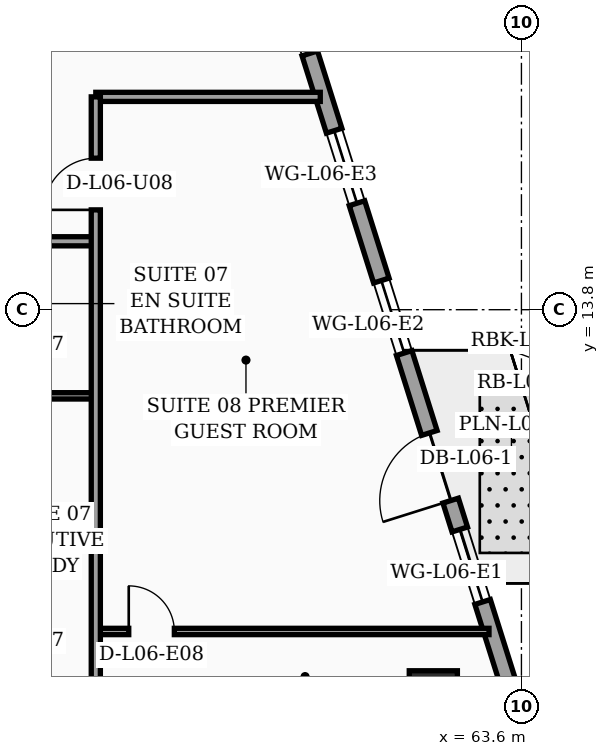
"""IFC4 building model, lengths in metres.
Left out: names, types, materials, properties, quantities, classifications, styles, units other than length and angle.
Written with IfcOpenShell. Run it as: python <this file> out.ifc"""

import sys

from ifc_helpers import new_model, si_unit, direction, frame, frame_2d, origin, origin_2d, place, context, subcontext, project, spatial, rectangle, hollow_rectangle, extrude, element, fill, save


model = new_model("IFC4")
c1 = context("Model", 3, precision=1e-05, world=origin(), true_north=direction((0.0, 1.0)))
c2 = subcontext(c1, "Body", "Model", "MODEL_VIEW")
j1 = project(units=[si_unit("LENGTHUNIT", "METRE"), si_unit("PLANEANGLEUNIT", "RADIAN")], contexts=[c1])
p1 = place(None, origin())
s1 = spatial("IfcSite", under=j1, at=p1, CompositionType="ELEMENT")
p2 = place(p1, origin())
s2 = spatial("IfcBuilding", under=s1, at=p2, CompositionType="ELEMENT")
p3 = place(p2, frame((0.0, 0.0, 30.8)))
s3 = spatial("IfcBuildingStorey", under=s2, at=p3, CompositionType="ELEMENT", Elevation=30.8)
p4 = place(p3, frame((61.861, 6.2, 0.0), z_axis=(0.0, 0.0, 1.0), x_axis=(1.0, 0.0, 0.0)))
e1 = element("IfcColumn", 1, at=p4, inside=s3, PredefinedType="COLUMN", context=c2, shape_type="SweptSolid", body=[
    extrude(hollow_rectangle(XDim=0.95, YDim=0.95, WallThickness=0.04, at=origin_2d()), origin(), (0.0, 0.0, 1.0), 3.56),
])
p5 = place(p3, frame((63.63, 5.505, 0.0), z_axis=(0.0, 0.0, 1.0), x_axis=(-0.300501856448, 0.953781229775, 0.0)))
e2 = element("IfcWall", 2, at=p5, inside=s3, PredefinedType="SOLIDWALL", context=c2, shape_type="SweptSolid", body=[
    extrude(rectangle(XDim=30.814, YDim=0.32, at=frame_2d((15.407, 0.0))), origin(), (0.0, 0.0, 1.0), 3.56),
])
p6 = place(p5, frame((4.747, 0.0, 0.0)))
e3 = element("IfcOpeningElement", 3, at=p6, cuts=e2, PredefinedType="OPENING", context=c2, shape_type="SweptSolid", body=[
    extrude(rectangle(XDim=1.4, YDim=2.25, at=frame_2d((0.7, 1.125))), frame((0.0, 0.17, 0.0), z_axis=(0.0, -1.0, 0.0), x_axis=(1.0, 0.0, 0.0)), (0.0, 0.0, 1.0), 0.34),
])
p7 = place(p5, frame((2.65, 0.0, 0.75)))
e4 = element("IfcOpeningElement", 4, at=p7, cuts=e2, PredefinedType="OPENING", context=c2, shape_type="SweptSolid", body=[
    extrude(rectangle(XDim=1.5, YDim=1.6, at=frame_2d((0.75, 0.8))), frame((0.0, 0.17, 0.0), z_axis=(0.0, -1.0, 0.0), x_axis=(1.0, 0.0, 0.0)), (0.0, 0.0, 1.0), 0.34),
])
p8 = place(p5, frame((7.8, 0.0, 0.75)))
e5 = element("IfcOpeningElement", 5, at=p8, cuts=e2, PredefinedType="OPENING", context=c2, shape_type="SweptSolid", body=[
    extrude(rectangle(XDim=1.5, YDim=1.6, at=frame_2d((0.75, 0.8))), frame((0.0, 0.17, 0.0), z_axis=(0.0, -1.0, 0.0), x_axis=(1.0, 0.0, 0.0)), (0.0, 0.0, 1.0), 0.34),
])
p9 = place(p5, frame((10.9, 0.0, 0.75)))
e6 = element("IfcOpeningElement", 6, at=p9, cuts=e2, PredefinedType="OPENING", context=c2, shape_type="SweptSolid", body=[
    extrude(rectangle(XDim=1.5, YDim=1.6, at=frame_2d((0.75, 0.8))), frame((0.0, 0.17, 0.0), z_axis=(0.0, -1.0, 0.0), x_axis=(1.0, 0.0, 0.0)), (0.0, 0.0, 1.0), 0.34),
])
p10 = place(p5, frame((14.0, 0.0, 0.75)))
e7 = element("IfcOpeningElement", 7, at=p10, cuts=e2, PredefinedType="OPENING", context=c2, shape_type="SweptSolid", body=[
    extrude(rectangle(XDim=1.5, YDim=1.6, at=frame_2d((0.75, 0.8))), frame((0.0, 0.17, 0.0), z_axis=(0.0, -1.0, 0.0), x_axis=(1.0, 0.0, 0.0)), (0.0, 0.0, 1.0), 0.34),
])
p11 = place(p5, frame((17.1, 0.0, 0.75)))
e8 = element("IfcOpeningElement", 8, at=p11, cuts=e2, PredefinedType="OPENING", context=c2, shape_type="SweptSolid", body=[
    extrude(rectangle(XDim=1.5, YDim=1.6, at=frame_2d((0.75, 0.8))), frame((0.0, 0.17, 0.0), z_axis=(0.0, -1.0, 0.0), x_axis=(1.0, 0.0, 0.0)), (0.0, 0.0, 1.0), 0.34),
])
p12 = place(p5, frame((20.2, 0.0, 0.75)))
e9 = element("IfcOpeningElement", 9, at=p12, cuts=e2, PredefinedType="OPENING", context=c2, shape_type="SweptSolid", body=[
    extrude(rectangle(XDim=1.5, YDim=1.6, at=frame_2d((0.75, 0.8))), frame((0.0, 0.17, 0.0), z_axis=(0.0, -1.0, 0.0), x_axis=(1.0, 0.0, 0.0)), (0.0, 0.0, 1.0), 0.34),
])
p13 = place(p5, frame((23.3, 0.0, 0.75)))
e10 = element("IfcOpeningElement", 10, at=p13, cuts=e2, PredefinedType="OPENING", context=c2, shape_type="SweptSolid", body=[
    extrude(rectangle(XDim=1.5, YDim=1.6, at=frame_2d((0.75, 0.8))), frame((0.0, 0.17, 0.0), z_axis=(0.0, -1.0, 0.0), x_axis=(1.0, 0.0, 0.0)), (0.0, 0.0, 1.0), 0.34),
])
p14 = place(p5, frame((26.4, 0.0, 0.75)))
e11 = element("IfcOpeningElement", 11, at=p14, cuts=e2, PredefinedType="OPENING", context=c2, shape_type="SweptSolid", body=[
    extrude(rectangle(XDim=1.5, YDim=1.6, at=frame_2d((0.75, 0.8))), frame((0.0, 0.17, 0.0), z_axis=(0.0, -1.0, 0.0), x_axis=(1.0, 0.0, 0.0)), (0.0, 0.0, 1.0), 0.34),
])
p15 = place(p3, frame((53.07, 12.1, 0.0), z_axis=(0.0, 0.0, 1.0), x_axis=(1.0, 0.0, 0.0)))
e12 = element("IfcWall", 12, at=p15, inside=s3, PredefinedType="PARTITIONING", context=c2, shape_type="SweptSolid", body=[
    extrude(rectangle(XDim=2.13, YDim=0.125, at=frame_2d((1.065, 0.0))), origin(), (0.0, 0.0, 1.0), 3.56),
])
p16 = place(p3, frame((32.4, 15.15, 0.0), z_axis=(0.0, 0.0, 1.0), x_axis=(1.0, 0.0, 0.0)))
e13 = element("IfcWall", 13, at=p16, inside=s3, PredefinedType="PARTITIONING", context=c2, shape_type="SweptSolid", body=[
    extrude(rectangle(XDim=22.8, YDim=0.18, at=frame_2d((11.4, 0.0))), origin(), (0.0, 0.0, 1.0), 2.84),
])
p17 = place(p16, frame((2.07, 0.0, 0.0)))
e14 = element("IfcOpeningElement", 14, at=p17, cuts=e13, PredefinedType="OPENING", context=c2, shape_type="SweptSolid", body=[
    extrude(rectangle(XDim=1.02, YDim=2.2, at=frame_2d((0.51, 1.1))), frame((0.0, 0.1, 0.0), z_axis=(0.0, -1.0, 0.0), x_axis=(1.0, 0.0, 0.0)), (0.0, 0.0, 1.0), 0.2),
])
p18 = place(p16, frame((9.5, 0.0, 0.0)))
e15 = element("IfcOpeningElement", 15, at=p18, cuts=e13, PredefinedType="OPENING", context=c2, shape_type="SweptSolid", body=[
    extrude(rectangle(XDim=1.02, YDim=2.2, at=frame_2d((0.51, 1.1))), frame((0.0, 0.1, 0.0), z_axis=(0.0, -1.0, 0.0), x_axis=(1.0, 0.0, 0.0)), (0.0, 0.0, 1.0), 0.2),
])
p19 = place(p16, frame((17.46, 0.0, 0.0)))
e16 = element("IfcOpeningElement", 16, at=p19, cuts=e13, PredefinedType="OPENING", context=c2, shape_type="SweptSolid", body=[
    extrude(rectangle(XDim=1.02, YDim=2.2, at=frame_2d((0.51, 1.1))), frame((0.0, 0.1, 0.0), z_axis=(0.0, -1.0, 0.0), x_axis=(1.0, 0.0, 0.0)), (0.0, 0.0, 1.0), 0.2),
])
p20 = place(p3, frame((55.2, 7.45, 0.0), z_axis=(0.0, 0.0, 1.0), x_axis=(1.0, 0.0, 0.0)))
e17 = element("IfcWall", 17, at=p20, inside=s3, PredefinedType="PARTITIONING", context=c2, shape_type="SweptSolid", body=[
    extrude(rectangle(XDim=7.76, YDim=0.125, at=frame_2d((3.88, 0.0))), origin(), (0.0, 0.0, 1.0), 3.04),
])
p21 = place(p20, frame((0.65, 0.0, 0.0)))
e18 = element("IfcOpeningElement", 18, at=p21, cuts=e17, PredefinedType="OPENING", context=c2, shape_type="SweptSolid", body=[
    extrude(rectangle(XDim=0.9, YDim=2.15, at=frame_2d((0.45, 1.075))), frame((0.0, 0.073, 0.0), z_axis=(0.0, -1.0, 0.0), x_axis=(1.0, 0.0, 0.0)), (0.0, 0.0, 1.0), 0.145),
])
p22 = place(p3, frame((55.2, 18.0, 0.0), z_axis=(0.0, 0.0, 1.0), x_axis=(1.0, 0.0, 0.0)))
e19 = element("IfcWall", 19, at=p22, inside=s3, PredefinedType="PARTITIONING", context=c2, shape_type="SweptSolid", body=[
    extrude(rectangle(XDim=4.43, YDim=0.18, at=frame_2d((2.215, 0.0))), origin(), (0.0, 0.0, 1.0), 3.04),
])
p23 = place(p3, frame((55.2, 2.44, 0.0), z_axis=(0.0, 0.0, 1.0), x_axis=(0.0, 1.0, 0.0)))
e20 = element("IfcWall", 20, at=p23, inside=s3, PredefinedType="PARTITIONING", context=c2, shape_type="SweptSolid", body=[
    extrude(rectangle(XDim=15.56, YDim=0.18, at=frame_2d((7.78, 0.0))), origin(), (0.0, 0.0, 1.0), 3.04),
])
p24 = place(p23, frame((13.33, 0.0, 0.0)))
e21 = element("IfcOpeningElement", 21, at=p24, cuts=e20, PredefinedType="OPENING", context=c2, shape_type="SweptSolid", body=[
    extrude(rectangle(XDim=1.02, YDim=2.2, at=frame_2d((0.51, 1.1))), frame((0.0, 0.1, 0.0), z_axis=(0.0, -1.0, 0.0), x_axis=(1.0, 0.0, 0.0)), (0.0, 0.0, 1.0), 0.2),
])
p25 = place(p6, origin())
e22 = element("IfcDoor", 22, at=p25, inside=s3, OperationType="SINGLE_SWING_LEFT", PredefinedType="DOOR", context=c2, shape_type="SweptSolid", body=[
    extrude(rectangle(XDim=1.4, YDim=2.25, at=frame_2d((0.7, 1.125))), frame((0.0, 0.025, 0.0), z_axis=(0.0, -1.0, 0.0), x_axis=(1.0, 0.0, 0.0)), (0.0, 0.0, 1.0), 0.05),
])
fill(e3, e22)
p26 = place(p7, origin())
e23 = element("IfcWindow", 23, at=p26, inside=s3, PartitioningType="SINGLE_PANEL", PredefinedType="WINDOW", context=c2, shape_type="SweptSolid", body=[
    extrude(rectangle(XDim=1.5, YDim=1.6, at=frame_2d((0.75, 0.8))), frame((0.0, 0.03, 0.0), z_axis=(0.0, -1.0, 0.0), x_axis=(1.0, 0.0, 0.0)), (0.0, 0.0, 1.0), 0.06),
])
fill(e4, e23)
p27 = place(p8, origin())
e24 = element("IfcWindow", 24, at=p27, inside=s3, PartitioningType="SINGLE_PANEL", PredefinedType="WINDOW", context=c2, shape_type="SweptSolid", body=[
    extrude(rectangle(XDim=1.5, YDim=1.6, at=frame_2d((0.75, 0.8))), frame((0.0, 0.03, 0.0), z_axis=(0.0, -1.0, 0.0), x_axis=(1.0, 0.0, 0.0)), (0.0, 0.0, 1.0), 0.06),
])
fill(e5, e24)
p28 = place(p9, origin())
e25 = element("IfcWindow", 25, at=p28, inside=s3, PartitioningType="SINGLE_PANEL", PredefinedType="WINDOW", context=c2, shape_type="SweptSolid", body=[
    extrude(rectangle(XDim=1.5, YDim=1.6, at=frame_2d((0.75, 0.8))), frame((0.0, 0.03, 0.0), z_axis=(0.0, -1.0, 0.0), x_axis=(1.0, 0.0, 0.0)), (0.0, 0.0, 1.0), 0.06),
])
fill(e6, e25)
p29 = place(p10, origin())
e26 = element("IfcWindow", 26, at=p29, inside=s3, PartitioningType="SINGLE_PANEL", PredefinedType="WINDOW", context=c2, shape_type="SweptSolid", body=[
    extrude(rectangle(XDim=1.5, YDim=1.6, at=frame_2d((0.75, 0.8))), frame((0.0, 0.03, 0.0), z_axis=(0.0, -1.0, 0.0), x_axis=(1.0, 0.0, 0.0)), (0.0, 0.0, 1.0), 0.06),
])
fill(e7, e26)
p30 = place(p21, origin())
e27 = element("IfcDoor", 27, at=p30, inside=s3, OperationType="SINGLE_SWING_LEFT", PredefinedType="DOOR", context=c2, shape_type="SweptSolid", body=[
    extrude(rectangle(XDim=0.9, YDim=2.15, at=frame_2d((0.45, 1.075))), frame((0.0, 0.025, 0.0), z_axis=(0.0, -1.0, 0.0), x_axis=(1.0, 0.0, 0.0)), (0.0, 0.0, 1.0), 0.05),
])
fill(e18, e27)
p31 = place(p24, origin())
e28 = element("IfcDoor", 28, at=p31, inside=s3, OperationType="SINGLE_SWING_LEFT", PredefinedType="DOOR", context=c2, shape_type="SweptSolid", body=[
    extrude(rectangle(XDim=1.02, YDim=2.2, at=frame_2d((0.51, 1.1))), frame((0.0, 0.025, 0.0), z_axis=(0.0, -1.0, 0.0), x_axis=(1.0, 0.0, 0.0)), (0.0, 0.0, 1.0), 0.05),
])
fill(e21, e28)
save(model, sys.argv[1])
